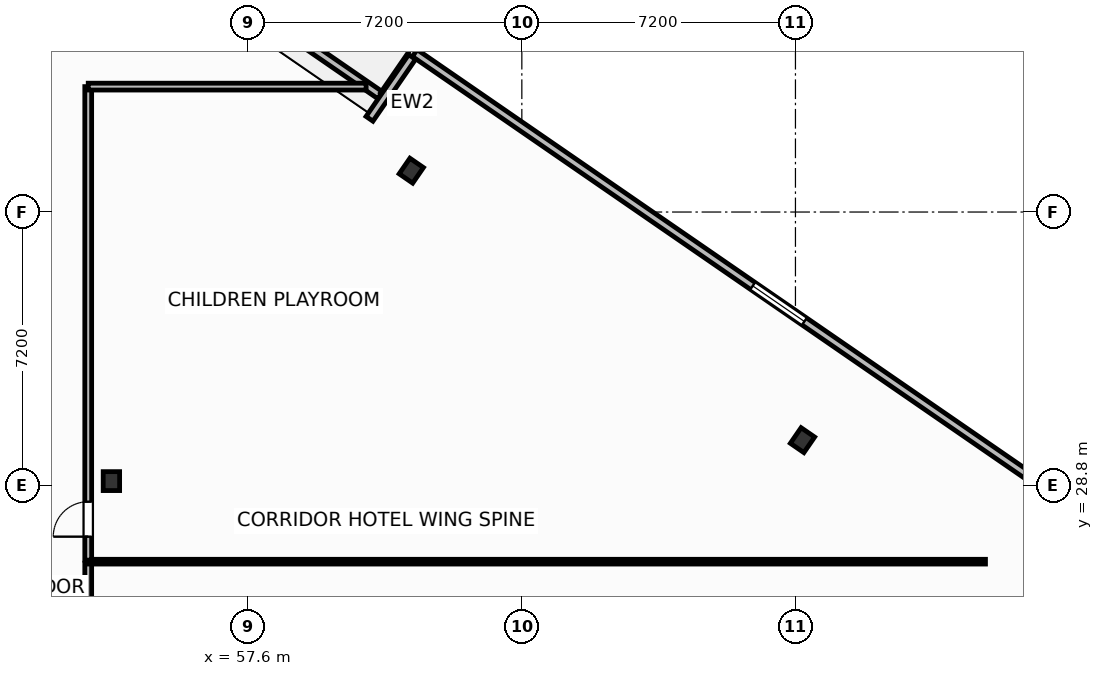
"""IFC4 building model, lengths in metres.
Left out: names, types, materials, properties, quantities, classifications, styles, units other than length and angle.
Written with IfcOpenShell. Run it as: python <this file> out.ifc"""

import sys

from ifc_helpers import new_model, si_unit, direction, frame, frame_2d, origin, origin_2d, place, context, subcontext, project, spatial, rectangle, i_section, extrude, element, fill, save


model = new_model("IFC4")
c1 = context("Model", 3, precision=1e-05, world=origin(), true_north=direction((0.0, 1.0)))
c2 = subcontext(c1, "Body", "Model", "MODEL_VIEW")
j1 = project(units=[si_unit("LENGTHUNIT", "METRE"), si_unit("PLANEANGLEUNIT", "RADIAN")], contexts=[c1])
p1 = place(None, origin())
s1 = spatial("IfcSite", under=j1, at=p1, CompositionType="ELEMENT")
p2 = place(p1, origin())
s2 = spatial("IfcBuilding", under=s1, at=p2, CompositionType="ELEMENT")
p3 = place(p2, frame((0.0, 0.0, 67.7)))
s3 = spatial("IfcBuildingStorey", under=s2, at=p3, CompositionType="ELEMENT", Elevation=67.7)
for number, where, z_axis, x_axis in (
    (1, (54.0, 28.92, 0.0), (0.0, 0.0, 1.0), (1.0, 0.0, 0.0)),
    (2, (72.186, 29.997, 0.0), (0.0, 0.0, 1.0), (0.824, -0.567, 0.0)),
    (3, (61.891, 37.088, 0.0), (0.0, 0.0, 1.0), (0.824, -0.567, 0.0)),
):
    element("IfcColumn", number, at=place(p3, frame(where, z_axis=z_axis, x_axis=x_axis)), inside=s3, PredefinedType="COLUMN", context=c2, shape_type="SweptSolid", body=[
        extrude(i_section(OverallWidth=0.432, OverallDepth=0.498, WebThickness=0.056, FlangeThickness=0.089, FilletRadius=0.025, at=origin_2d()), origin(), (0.0, 0.0, 1.0), 3.7),
    ])
p4 = place(p3, frame((56.132, 42.476, 0.0), z_axis=(0.0, 0.0, 1.0), x_axis=(0.823534636215, -0.567265989598, 0.0)))
e4 = element("IfcWall", 4, at=p4, inside=s3, PredefinedType="SOLIDWALL", context=c2, shape_type="SweptSolid", body=[
    extrude(rectangle(XDim=6.0, YDim=0.22, at=frame_2d((3.0, 0.0))), origin(), (0.0, 0.0, 1.0), 2.66),
])
p5 = place(p4, frame((0.548, 0.0, 0.0)))
e5 = element("IfcOpeningElement", 5, at=p5, cuts=e4, PredefinedType="OPENING", context=c2, shape_type="SweptSolid", body=[
    extrude(rectangle(XDim=1.5, YDim=2.25, at=frame_2d((0.75, 1.125))), frame((0.0, 0.12, 0.0), z_axis=(0.0, -1.0, 0.0), x_axis=(1.0, 0.0, 0.0)), (0.0, 0.0, 1.0), 0.24),
])
p6 = place(p3, frame((81.127, 26.995, 0.0), z_axis=(0.0, 0.0, 1.0), x_axis=(-0.823530169317, 0.567272474411, 0.0)))
e6 = element("IfcWall", 6, at=p6, inside=s3, PredefinedType="SOLIDWALL", context=c2, shape_type="SweptSolid", body=[
    extrude(rectangle(XDim=23.247, YDim=0.22, at=frame_2d((11.624, 0.0))), origin(), (0.0, 0.0, 1.0), 2.66),
])
p7 = place(p6, frame((10.799, 0.0, 0.8)))
e7 = element("IfcOpeningElement", 7, at=p7, cuts=e6, PredefinedType="OPENING", context=c2, shape_type="SweptSolid", body=[
    extrude(rectangle(XDim=1.65, YDim=1.65, at=frame_2d((0.825, 0.825))), frame((0.0, 0.12, 0.0), z_axis=(0.0, -1.0, 0.0), x_axis=(1.0, 0.0, 0.0)), (0.0, 0.0, 1.0), 0.24),
])
p8 = place(p3, frame((61.912, 40.079, 0.0), z_axis=(0.0, 0.0, 1.0), x_axis=(-0.567189720735, -0.82358716642, 0.0)))
e8 = element("IfcWall", 8, at=p8, inside=s3, PredefinedType="SOLIDWALL", context=c2, shape_type="SweptSolid", body=[
    extrude(rectangle(XDim=1.975, YDim=0.22, at=frame_2d((0.987, 0.0))), origin(), (0.0, 0.0, 1.0), 2.66),
])
p9 = place(p3, frame((53.39, 19.24, 0.0), z_axis=(0.0, 0.0, 1.0), x_axis=(0.0, 1.0, 0.0)))
e9 = element("IfcWall", 9, at=p9, inside=s3, PredefinedType="PARTITIONING", context=c2, shape_type="SweptSolid", body=[
    extrude(rectangle(XDim=7.52, YDim=0.18, at=frame_2d((3.76, 0.0))), origin(), (0.0, 0.0, 1.0), 3.38),
])
p10 = place(p9, frame((2.1, 0.0, 0.0)))
e10 = element("IfcOpeningElement", 10, at=p10, cuts=e9, PredefinedType="OPENING", context=c2, shape_type="SweptSolid", body=[
    extrude(rectangle(XDim=0.92, YDim=2.05, at=frame_2d((0.46, 1.025))), frame((0.0, 0.1, 0.0), z_axis=(0.0, -1.0, 0.0), x_axis=(1.0, 0.0, 0.0)), (0.0, 0.0, 1.0), 0.2),
])
p11 = place(p3, frame((53.39, 26.8, 0.0), z_axis=(0.0, 0.0, 1.0), x_axis=(1.0, 0.0, 0.0)))
e11 = element("IfcWall", 11, at=p11, inside=s3, PredefinedType="PARTITIONING", context=c2, shape_type="SweptSolid", body=[
    extrude(rectangle(XDim=23.61, YDim=0.125, at=frame_2d((11.805, 0.0))), origin(), (0.0, 0.0, 1.0), 3.38),
])
p12 = place(p3, frame((53.39, 26.84, 0.0), z_axis=(0.0, 0.0, 1.0), x_axis=(0.0, 1.0, 0.0)))
e12 = element("IfcWall", 12, at=p12, inside=s3, PredefinedType="PARTITIONING", context=c2, shape_type="SweptSolid", body=[
    extrude(rectangle(XDim=12.46, YDim=0.18, at=frame_2d((6.23, 0.0))), origin(), (0.0, 0.0, 1.0), 3.38),
])
p13 = place(p12, frame((0.618, 0.0, 0.0)))
e13 = element("IfcOpeningElement", 13, at=p13, cuts=e12, PredefinedType="OPENING", context=c2, shape_type="SweptSolid", body=[
    extrude(rectangle(XDim=0.92, YDim=2.05, at=frame_2d((0.46, 1.025))), frame((0.0, 0.1, 0.0), z_axis=(0.0, -1.0, 0.0), x_axis=(1.0, 0.0, 0.0)), (0.0, 0.0, 1.0), 0.2),
])
p14 = place(p3, frame((53.39, 39.3, 0.0), z_axis=(0.0, 0.0, 1.0), x_axis=(1.0, 0.0, 0.0)))
e14 = element("IfcWall", 14, at=p14, inside=s3, PredefinedType="PARTITIONING", context=c2, shape_type="SweptSolid", body=[
    extrude(rectangle(XDim=7.313, YDim=0.18, at=frame_2d((3.656, 0.0))), origin(), (0.0, 0.0, 1.0), 3.38),
])
p15 = place(p7, origin())
e15 = element("IfcWindow", 15, at=p15, inside=s3, PartitioningType="SINGLE_PANEL", PredefinedType="WINDOW", context=c2, shape_type="SweptSolid", body=[
    extrude(rectangle(XDim=1.65, YDim=1.65, at=frame_2d((0.825, 0.825))), frame((0.0, 0.03, 0.0), z_axis=(0.0, -1.0, 0.0), x_axis=(1.0, 0.0, 0.0)), (0.0, 0.0, 1.0), 0.06),
])
fill(e7, e15)
p16 = place(p13, origin())
e16 = element("IfcDoor", 16, at=p16, inside=s3, OperationType="SINGLE_SWING_LEFT", PredefinedType="DOOR", context=c2, shape_type="SweptSolid", body=[
    extrude(rectangle(XDim=0.92, YDim=2.05, at=frame_2d((0.46, 1.025))), frame((0.0, 0.025, 0.0), z_axis=(0.0, -1.0, 0.0), x_axis=(1.0, 0.0, 0.0)), (0.0, 0.0, 1.0), 0.05),
])
fill(e13, e16)
save(model, sys.argv[1])
